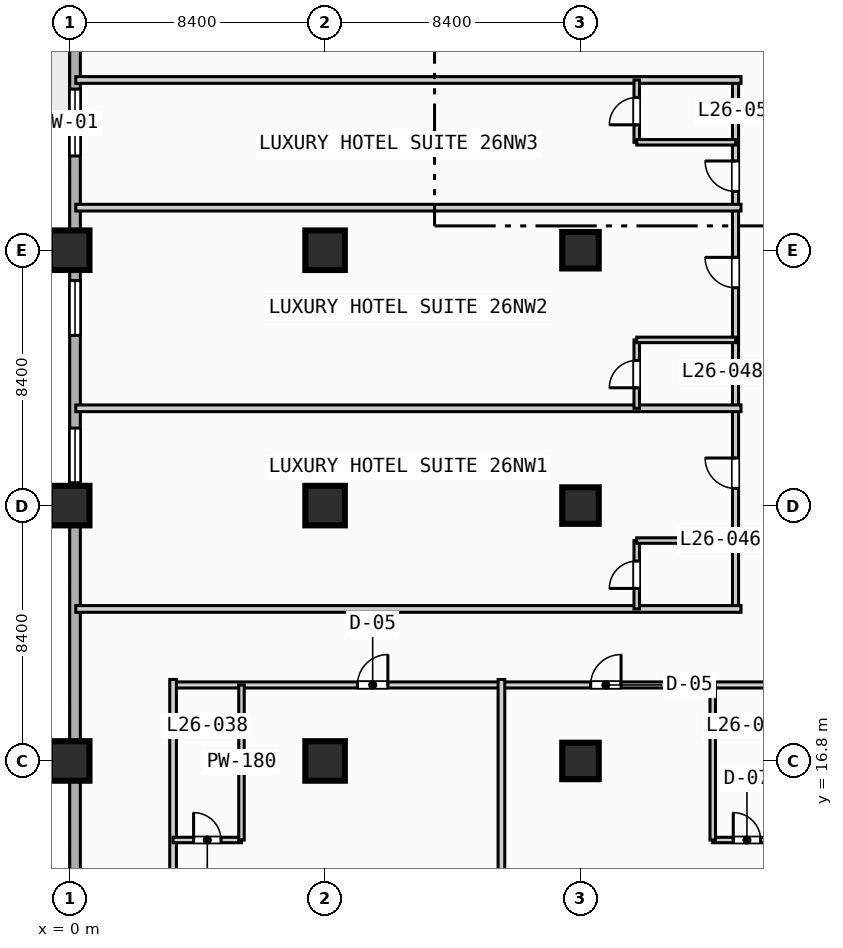
"""IFC4 building model, lengths in metres.
Left out: names, types, materials, properties, quantities, classifications, styles, units other than length and angle.
Written with IfcOpenShell. Run it as: python <this file> out.ifc"""

import sys

from ifc_helpers import new_model, si_unit, direction, frame, frame_2d, origin, origin_2d, place, context, subcontext, project, spatial, rectangle, extrude, element, fill, save


model = new_model("IFC4")
c1 = context("Model", 3, precision=1e-05, world=origin(), true_north=direction((0.0, 1.0)))
c2 = subcontext(c1, "Body", "Model", "MODEL_VIEW")
j1 = project(units=[si_unit("LENGTHUNIT", "METRE"), si_unit("PLANEANGLEUNIT", "RADIAN")], contexts=[c1])
p1 = place(None, origin())
s1 = spatial("IfcSite", under=j1, at=p1, CompositionType="ELEMENT")
p2 = place(p1, origin())
s2 = spatial("IfcBuilding", under=s1, at=p2, CompositionType="ELEMENT")
p3 = place(p2, frame((0.0, 0.0, 111.4)))
s3 = spatial("IfcBuildingStorey", under=s2, at=p3, CompositionType="ELEMENT", Elevation=111.4)
for number, where, z_axis, x_axis in (
    (1, (0.0, 16.8, 0.0), (0.0, 0.0, 1.0), (1.0, 0.0, 0.0)),
    (2, (0.0, 25.2, 0.0), (0.0, 0.0, 1.0), (1.0, 0.0, 0.0)),
    (3, (0.0, 33.6, 0.0), (0.0, 0.0, 1.0), (1.0, 0.0, 0.0)),
    (4, (8.4, 16.8, 0.0), (0.0, 0.0, 1.0), (1.0, 0.0, 0.0)),
    (5, (8.4, 25.2, 0.0), (0.0, 0.0, 1.0), (1.0, 0.0, 0.0)),
    (6, (8.4, 33.6, 0.0), (0.0, 0.0, 1.0), (1.0, 0.0, 0.0)),
):
    element("IfcColumn", number, at=place(p3, frame(where, z_axis=z_axis, x_axis=x_axis)), inside=s3, PredefinedType="COLUMN", context=c2, shape_type="SweptSolid", body=[
        extrude(rectangle(XDim=1.3, YDim=1.3, at=origin_2d()), origin(), (0.0, 0.0, 1.0), 3.8),
    ])
for number, where, z_axis, x_axis in (
    (7, (16.8, 16.8, 0.0), (0.0, 0.0, 1.0), (1.0, 0.0, 0.0)),
    (8, (16.8, 25.2, 0.0), (0.0, 0.0, 1.0), (1.0, 0.0, 0.0)),
    (9, (16.8, 33.6, 0.0), (0.0, 0.0, 1.0), (1.0, 0.0, 0.0)),
):
    element("IfcColumn", number, at=place(p3, frame(where, z_axis=z_axis, x_axis=x_axis)), inside=s3, PredefinedType="COLUMN", context=c2, shape_type="SweptSolid", body=[
        extrude(rectangle(XDim=1.2, YDim=1.2, at=origin_2d()), origin(), (0.0, 0.0, 1.0), 3.8),
    ])
p4 = place(p3, frame((0.175, 3.175, 0.0), z_axis=(0.0, 0.0, 1.0), x_axis=(0.0, 1.0, 0.0)))
e10 = element("IfcWall", 10, at=p4, inside=s3, PredefinedType="STANDARD", context=c2, shape_type="SweptSolid", body=[
    extrude(rectangle(XDim=86.05, YDim=0.35, at=frame_2d((43.025, 0.0))), origin(), (0.0, 0.0, 1.0), 3.55),
])
p5 = place(p4, frame((42.325, 0.0, 0.0)))
e11 = element("IfcOpeningElement", 11, at=p5, cuts=e10, PredefinedType="OPENING", context=c2, shape_type="SweptSolid", body=[
    extrude(rectangle(XDim=1.4, YDim=2.2, at=frame_2d((0.7, 1.1))), frame((0.0, 0.185, 0.0), z_axis=(0.0, -1.0, 0.0), x_axis=(1.0, 0.0, 0.0)), (0.0, 0.0, 1.0), 0.37),
])
p6 = place(p4, frame((33.525, 0.0, 0.85)))
e12 = element("IfcOpeningElement", 12, at=p6, cuts=e10, PredefinedType="OPENING", context=c2, shape_type="SweptSolid", body=[
    extrude(rectangle(XDim=2.2, YDim=1.8, at=frame_2d((1.1, 0.9))), frame((0.0, 0.185, 0.0), z_axis=(0.0, -1.0, 0.0), x_axis=(1.0, 0.0, 0.0)), (0.0, 0.0, 1.0), 0.37),
])
p7 = place(p4, frame((22.775, 0.0, 0.85)))
e13 = element("IfcOpeningElement", 13, at=p7, cuts=e10, PredefinedType="OPENING", context=c2, shape_type="SweptSolid", body=[
    extrude(rectangle(XDim=1.8, YDim=1.8, at=frame_2d((0.9, 0.9))), frame((0.0, 0.185, 0.0), z_axis=(0.0, -1.0, 0.0), x_axis=(1.0, 0.0, 0.0)), (0.0, 0.0, 1.0), 0.37),
])
p8 = place(p4, frame((27.625, 0.0, 0.85)))
e14 = element("IfcOpeningElement", 14, at=p8, cuts=e10, PredefinedType="OPENING", context=c2, shape_type="SweptSolid", body=[
    extrude(rectangle(XDim=1.8, YDim=1.8, at=frame_2d((0.9, 0.9))), frame((0.0, 0.185, 0.0), z_axis=(0.0, -1.0, 0.0), x_axis=(1.0, 0.0, 0.0)), (0.0, 0.0, 1.0), 0.37),
])
p9 = place(p3, frame((3.4, 19.3, 0.0), z_axis=(0.0, 0.0, 1.0), x_axis=(1.0, 0.0, 0.0)))
e15 = element("IfcWall", 15, at=p9, inside=s3, PredefinedType="PARTITIONING", context=c2, shape_type="SweptSolid", body=[
    extrude(rectangle(XDim=35.8, YDim=0.2, at=frame_2d((17.9, 0.0))), origin(), (0.0, 0.0, 1.0), 3.55),
])
p10 = place(p9, frame((6.065, 0.0, 0.0)))
e16 = element("IfcOpeningElement", 16, at=p10, cuts=e15, PredefinedType="OPENING", context=c2, shape_type="SweptSolid", body=[
    extrude(rectangle(XDim=1.0, YDim=2.15, at=frame_2d((0.5, 1.075))), frame((0.0, 0.11, 0.0), z_axis=(0.0, -1.0, 0.0), x_axis=(1.0, 0.0, 0.0)), (0.0, 0.0, 1.0), 0.22),
])
p11 = place(p9, frame((13.735, 0.0, 0.0)))
e17 = element("IfcOpeningElement", 17, at=p11, cuts=e15, PredefinedType="OPENING", context=c2, shape_type="SweptSolid", body=[
    extrude(rectangle(XDim=1.0, YDim=2.15, at=frame_2d((0.5, 1.075))), frame((0.0, 0.11, 0.0), z_axis=(0.0, -1.0, 0.0), x_axis=(1.0, 0.0, 0.0)), (0.0, 0.0, 1.0), 0.22),
])
p12 = place(p9, frame((22.96, 0.0, 0.0)))
e18 = element("IfcOpeningElement", 18, at=p12, cuts=e15, PredefinedType="OPENING", context=c2, shape_type="SweptSolid", body=[
    extrude(rectangle(XDim=1.0, YDim=2.15, at=frame_2d((0.5, 1.075))), frame((0.0, 0.11, 0.0), z_axis=(0.0, -1.0, 0.0), x_axis=(1.0, 0.0, 0.0)), (0.0, 0.0, 1.0), 0.22),
])
p13 = place(p9, frame((30.86, 0.0, 0.0)))
e19 = element("IfcOpeningElement", 19, at=p13, cuts=e15, PredefinedType="OPENING", context=c2, shape_type="SweptSolid", body=[
    extrude(rectangle(XDim=1.0, YDim=2.15, at=frame_2d((0.5, 1.075))), frame((0.0, 0.11, 0.0), z_axis=(0.0, -1.0, 0.0), x_axis=(1.0, 0.0, 0.0)), (0.0, 0.0, 1.0), 0.22),
])
p14 = place(p3, frame((3.4, 0.2, 0.0), z_axis=(0.0, 0.0, 1.0), x_axis=(0.0, 1.0, 0.0)))
e20 = element("IfcWall", 20, at=p14, inside=s3, PredefinedType="PARTITIONING", context=c2, shape_type="SweptSolid", body=[
    extrude(rectangle(XDim=19.28, YDim=0.22, at=frame_2d((9.64, 0.0))), origin(), (0.0, 0.0, 1.0), 3.55),
])
p15 = place(p3, frame((3.4, 14.2, 0.0), z_axis=(0.0, 0.0, 1.0), x_axis=(1.0, 0.0, 0.0)))
e21 = element("IfcWall", 21, at=p15, inside=s3, PredefinedType="PLUMBINGWALL", context=c2, shape_type="SweptSolid", body=[
    extrude(rectangle(XDim=2.25, YDim=0.18, at=frame_2d((1.125, 0.0))), origin(), (0.0, 0.0, 1.0), 3.55),
])
p16 = place(p15, frame((0.675, 0.0, 0.0)))
e22 = element("IfcOpeningElement", 22, at=p16, cuts=e21, PredefinedType="OPENING", context=c2, shape_type="SweptSolid", body=[
    extrude(rectangle(XDim=0.9, YDim=2.1, at=frame_2d((0.45, 1.05))), frame((0.0, 0.1, 0.0), z_axis=(0.0, -1.0, 0.0), x_axis=(1.0, 0.0, 0.0)), (0.0, 0.0, 1.0), 0.2),
])
p17 = place(p3, frame((5.65, 14.2, 0.0), z_axis=(0.0, 0.0, 1.0), x_axis=(0.0, 1.0, 0.0)))
e23 = element("IfcWall", 23, at=p17, inside=s3, PredefinedType="PLUMBINGWALL", context=c2, shape_type="SweptSolid", body=[
    extrude(rectangle(XDim=5.1, YDim=0.18, at=frame_2d((2.55, 0.0))), origin(), (0.0, 0.0, 1.0), 3.55),
])
p18 = place(p3, frame((14.2, 0.2, 0.0), z_axis=(0.0, 0.0, 1.0), x_axis=(0.0, 1.0, 0.0)))
e24 = element("IfcWall", 24, at=p18, inside=s3, PredefinedType="PARTITIONING", context=c2, shape_type="SweptSolid", body=[
    extrude(rectangle(XDim=19.28, YDim=0.22, at=frame_2d((9.64, 0.0))), origin(), (0.0, 0.0, 1.0), 3.55),
])
p19 = place(p3, frame((21.15, 14.2, 0.0), z_axis=(0.0, 0.0, 1.0), x_axis=(1.0, 0.0, 0.0)))
e25 = element("IfcWall", 25, at=p19, inside=s3, PredefinedType="PLUMBINGWALL", context=c2, shape_type="SweptSolid", body=[
    extrude(rectangle(XDim=2.25, YDim=0.18, at=frame_2d((1.125, 0.0))), origin(), (0.0, 0.0, 1.0), 3.55),
])
p20 = place(p19, frame((0.675, 0.0, 0.0)))
e26 = element("IfcOpeningElement", 26, at=p20, cuts=e25, PredefinedType="OPENING", context=c2, shape_type="SweptSolid", body=[
    extrude(rectangle(XDim=0.9, YDim=2.1, at=frame_2d((0.45, 1.05))), frame((0.0, 0.1, 0.0), z_axis=(0.0, -1.0, 0.0), x_axis=(1.0, 0.0, 0.0)), (0.0, 0.0, 1.0), 0.2),
])
p21 = place(p3, frame((21.15, 14.2, 0.0), z_axis=(0.0, 0.0, 1.0), x_axis=(0.0, 1.0, 0.0)))
e27 = element("IfcWall", 27, at=p21, inside=s3, PredefinedType="PLUMBINGWALL", context=c2, shape_type="SweptSolid", body=[
    extrude(rectangle(XDim=5.1, YDim=0.18, at=frame_2d((2.55, 0.0))), origin(), (0.0, 0.0, 1.0), 3.55),
])
p22 = place(p3, frame((21.9, 21.8, 0.0), z_axis=(0.0, 0.0, 1.0), x_axis=(0.0, 1.0, 0.0)))
e28 = element("IfcWall", 28, at=p22, inside=s3, PredefinedType="PARTITIONING", context=c2, shape_type="SweptSolid", body=[
    extrude(rectangle(XDim=17.4, YDim=0.2, at=frame_2d((8.7, 0.0))), origin(), (0.0, 0.0, 1.0), 3.55),
])
p23 = place(p22, frame((3.965, 0.0, 0.0)))
e29 = element("IfcOpeningElement", 29, at=p23, cuts=e28, PredefinedType="OPENING", context=c2, shape_type="SweptSolid", body=[
    extrude(rectangle(XDim=1.0, YDim=2.15, at=frame_2d((0.5, 1.075))), frame((0.0, 0.11, 0.0), z_axis=(0.0, -1.0, 0.0), x_axis=(1.0, 0.0, 0.0)), (0.0, 0.0, 1.0), 0.22),
])
p24 = place(p22, frame((10.565, 0.0, 0.0)))
e30 = element("IfcOpeningElement", 30, at=p24, cuts=e28, PredefinedType="OPENING", context=c2, shape_type="SweptSolid", body=[
    extrude(rectangle(XDim=1.0, YDim=2.15, at=frame_2d((0.5, 1.075))), frame((0.0, 0.11, 0.0), z_axis=(0.0, -1.0, 0.0), x_axis=(1.0, 0.0, 0.0)), (0.0, 0.0, 1.0), 0.22),
])
p25 = place(p22, frame((13.735, 0.0, 0.0)))
e31 = element("IfcOpeningElement", 31, at=p25, cuts=e28, PredefinedType="OPENING", context=c2, shape_type="SweptSolid", body=[
    extrude(rectangle(XDim=1.0, YDim=2.15, at=frame_2d((0.5, 1.075))), frame((0.0, 0.11, 0.0), z_axis=(0.0, -1.0, 0.0), x_axis=(1.0, 0.0, 0.0)), (0.0, 0.0, 1.0), 0.22),
])
p26 = place(p3, frame((0.2, 21.8, 0.0), z_axis=(0.0, 0.0, 1.0), x_axis=(1.0, 0.0, 0.0)))
e32 = element("IfcWall", 32, at=p26, inside=s3, PredefinedType="PARTITIONING", context=c2, shape_type="SweptSolid", body=[
    extrude(rectangle(XDim=21.88, YDim=0.22, at=frame_2d((10.94, 0.0))), origin(), (0.0, 0.0, 1.0), 3.55),
])
p27 = place(p3, frame((18.65, 21.8, 0.0), z_axis=(0.0, 0.0, 1.0), x_axis=(0.0, 1.0, 0.0)))
e33 = element("IfcWall", 33, at=p27, inside=s3, PredefinedType="PLUMBINGWALL", context=c2, shape_type="SweptSolid", body=[
    extrude(rectangle(XDim=2.25, YDim=0.18, at=frame_2d((1.125, 0.0))), origin(), (0.0, 0.0, 1.0), 3.55),
])
p28 = place(p27, frame((0.675, 0.0, 0.0)))
e34 = element("IfcOpeningElement", 34, at=p28, cuts=e33, PredefinedType="OPENING", context=c2, shape_type="SweptSolid", body=[
    extrude(rectangle(XDim=0.9, YDim=2.1, at=frame_2d((0.45, 1.05))), frame((0.0, 0.1, 0.0), z_axis=(0.0, -1.0, 0.0), x_axis=(1.0, 0.0, 0.0)), (0.0, 0.0, 1.0), 0.2),
])
p29 = place(p3, frame((18.65, 24.05, 0.0), z_axis=(0.0, 0.0, 1.0), x_axis=(1.0, 0.0, 0.0)))
e35 = element("IfcWall", 35, at=p29, inside=s3, PredefinedType="PLUMBINGWALL", context=c2, shape_type="SweptSolid", body=[
    extrude(rectangle(XDim=3.25, YDim=0.18, at=frame_2d((1.625, 0.0))), origin(), (0.0, 0.0, 1.0), 3.55),
])
p30 = place(p3, frame((0.2, 28.4, 0.0), z_axis=(0.0, 0.0, 1.0), x_axis=(1.0, 0.0, 0.0)))
e36 = element("IfcWall", 36, at=p30, inside=s3, PredefinedType="PARTITIONING", context=c2, shape_type="SweptSolid", body=[
    extrude(rectangle(XDim=21.88, YDim=0.22, at=frame_2d((10.94, 0.0))), origin(), (0.0, 0.0, 1.0), 3.55),
])
p31 = place(p3, frame((18.65, 28.4, 0.0), z_axis=(0.0, 0.0, 1.0), x_axis=(0.0, 1.0, 0.0)))
e37 = element("IfcWall", 37, at=p31, inside=s3, PredefinedType="PLUMBINGWALL", context=c2, shape_type="SweptSolid", body=[
    extrude(rectangle(XDim=2.25, YDim=0.18, at=frame_2d((1.125, 0.0))), origin(), (0.0, 0.0, 1.0), 3.55),
])
p32 = place(p31, frame((0.675, 0.0, 0.0)))
e38 = element("IfcOpeningElement", 38, at=p32, cuts=e37, PredefinedType="OPENING", context=c2, shape_type="SweptSolid", body=[
    extrude(rectangle(XDim=0.9, YDim=2.1, at=frame_2d((0.45, 1.05))), frame((0.0, 0.1, 0.0), z_axis=(0.0, -1.0, 0.0), x_axis=(1.0, 0.0, 0.0)), (0.0, 0.0, 1.0), 0.2),
])
p33 = place(p3, frame((18.65, 30.65, 0.0), z_axis=(0.0, 0.0, 1.0), x_axis=(1.0, 0.0, 0.0)))
e39 = element("IfcWall", 39, at=p33, inside=s3, PredefinedType="PLUMBINGWALL", context=c2, shape_type="SweptSolid", body=[
    extrude(rectangle(XDim=3.25, YDim=0.18, at=frame_2d((1.625, 0.0))), origin(), (0.0, 0.0, 1.0), 3.55),
])
for number, where, z_axis, x_axis in (
    (40, (0.2, 35.0, 0.0), (0.0, 0.0, 1.0), (1.0, 0.0, 0.0)),
    (41, (0.2, 39.2, 0.0), (0.0, 0.0, 1.0), (1.0, 0.0, 0.0)),
):
    element("IfcWall", number, at=place(p3, frame(where, z_axis=z_axis, x_axis=x_axis)), inside=s3, PredefinedType="PARTITIONING", context=c2, shape_type="SweptSolid", body=[
        extrude(rectangle(XDim=21.88, YDim=0.22, at=frame_2d((10.94, 0.0))), origin(), (0.0, 0.0, 1.0), 3.55),
    ])
p34 = place(p3, frame((18.65, 37.15, 0.0), z_axis=(0.0, 0.0, 1.0), x_axis=(0.0, 1.0, 0.0)))
e42 = element("IfcWall", 42, at=p34, inside=s3, PredefinedType="PLUMBINGWALL", context=c2, shape_type="SweptSolid", body=[
    extrude(rectangle(XDim=2.05, YDim=0.18, at=frame_2d((1.025, 0.0))), origin(), (0.0, 0.0, 1.0), 3.55),
])
p35 = place(p34, frame((0.575, 0.0, 0.0)))
e43 = element("IfcOpeningElement", 43, at=p35, cuts=e42, PredefinedType="OPENING", context=c2, shape_type="SweptSolid", body=[
    extrude(rectangle(XDim=0.9, YDim=2.1, at=frame_2d((0.45, 1.05))), frame((0.0, 0.1, 0.0), z_axis=(0.0, -1.0, 0.0), x_axis=(1.0, 0.0, 0.0)), (0.0, 0.0, 1.0), 0.2),
])
p36 = place(p3, frame((18.65, 37.15, 0.0), z_axis=(0.0, 0.0, 1.0), x_axis=(1.0, 0.0, 0.0)))
e44 = element("IfcWall", 44, at=p36, inside=s3, PredefinedType="PLUMBINGWALL", context=c2, shape_type="SweptSolid", body=[
    extrude(rectangle(XDim=3.25, YDim=0.18, at=frame_2d((1.625, 0.0))), origin(), (0.0, 0.0, 1.0), 3.55),
])
p37 = place(p6, origin())
e45 = element("IfcWindow", 45, at=p37, inside=s3, PartitioningType="SINGLE_PANEL", PredefinedType="WINDOW", context=c2, shape_type="SweptSolid", body=[
    extrude(rectangle(XDim=2.2, YDim=1.8, at=frame_2d((1.1, 0.9))), frame((0.0, 0.03, 0.0), z_axis=(0.0, -1.0, 0.0), x_axis=(1.0, 0.0, 0.0)), (0.0, 0.0, 1.0), 0.06),
])
fill(e12, e45)
p38 = place(p7, origin())
e46 = element("IfcWindow", 46, at=p38, inside=s3, PartitioningType="SINGLE_PANEL", PredefinedType="WINDOW", context=c2, shape_type="SweptSolid", body=[
    extrude(rectangle(XDim=1.8, YDim=1.8, at=frame_2d((0.9, 0.9))), frame((0.0, 0.03, 0.0), z_axis=(0.0, -1.0, 0.0), x_axis=(1.0, 0.0, 0.0)), (0.0, 0.0, 1.0), 0.06),
])
fill(e13, e46)
p39 = place(p8, origin())
e47 = element("IfcWindow", 47, at=p39, inside=s3, PartitioningType="SINGLE_PANEL", PredefinedType="WINDOW", context=c2, shape_type="SweptSolid", body=[
    extrude(rectangle(XDim=1.8, YDim=1.8, at=frame_2d((0.9, 0.9))), frame((0.0, 0.03, 0.0), z_axis=(0.0, -1.0, 0.0), x_axis=(1.0, 0.0, 0.0)), (0.0, 0.0, 1.0), 0.06),
])
fill(e14, e47)
p40 = place(p10, origin())
e48 = element("IfcDoor", 48, at=p40, inside=s3, OperationType="SINGLE_SWING_RIGHT", PredefinedType="DOOR", context=c2, shape_type="SweptSolid", body=[
    extrude(rectangle(XDim=1.0, YDim=2.15, at=frame_2d((0.5, 1.075))), frame((0.0, 0.025, 0.0), z_axis=(0.0, -1.0, 0.0), x_axis=(1.0, 0.0, 0.0)), (0.0, 0.0, 1.0), 0.05),
])
fill(e16, e48)
p41 = place(p11, origin())
e49 = element("IfcDoor", 49, at=p41, inside=s3, OperationType="SINGLE_SWING_RIGHT", PredefinedType="DOOR", context=c2, shape_type="SweptSolid", body=[
    extrude(rectangle(XDim=1.0, YDim=2.15, at=frame_2d((0.5, 1.075))), frame((0.0, 0.025, 0.0), z_axis=(0.0, -1.0, 0.0), x_axis=(1.0, 0.0, 0.0)), (0.0, 0.0, 1.0), 0.05),
])
fill(e17, e49)
p42 = place(p16, origin())
e50 = element("IfcDoor", 50, at=p42, inside=s3, OperationType="SINGLE_SWING_LEFT", PredefinedType="DOOR", context=c2, shape_type="SweptSolid", body=[
    extrude(rectangle(XDim=0.9, YDim=2.1, at=frame_2d((0.45, 1.05))), frame((0.0, 0.025, 0.0), z_axis=(0.0, -1.0, 0.0), x_axis=(1.0, 0.0, 0.0)), (0.0, 0.0, 1.0), 0.05),
])
fill(e22, e50)
p43 = place(p20, origin())
e51 = element("IfcDoor", 51, at=p43, inside=s3, OperationType="SINGLE_SWING_LEFT", PredefinedType="DOOR", context=c2, shape_type="SweptSolid", body=[
    extrude(rectangle(XDim=0.9, YDim=2.1, at=frame_2d((0.45, 1.05))), frame((0.0, 0.025, 0.0), z_axis=(0.0, -1.0, 0.0), x_axis=(1.0, 0.0, 0.0)), (0.0, 0.0, 1.0), 0.05),
])
fill(e26, e51)
p44 = place(p23, origin())
e52 = element("IfcDoor", 52, at=p44, inside=s3, OperationType="SINGLE_SWING_RIGHT", PredefinedType="DOOR", context=c2, shape_type="SweptSolid", body=[
    extrude(rectangle(XDim=1.0, YDim=2.15, at=frame_2d((0.5, 1.075))), frame((0.0, 0.025, 0.0), z_axis=(0.0, -1.0, 0.0), x_axis=(1.0, 0.0, 0.0)), (0.0, 0.0, 1.0), 0.05),
])
fill(e29, e52)
p45 = place(p24, origin())
e53 = element("IfcDoor", 53, at=p45, inside=s3, OperationType="SINGLE_SWING_RIGHT", PredefinedType="DOOR", context=c2, shape_type="SweptSolid", body=[
    extrude(rectangle(XDim=1.0, YDim=2.15, at=frame_2d((0.5, 1.075))), frame((0.0, 0.025, 0.0), z_axis=(0.0, -1.0, 0.0), x_axis=(1.0, 0.0, 0.0)), (0.0, 0.0, 1.0), 0.05),
])
fill(e30, e53)
p46 = place(p25, origin())
e54 = element("IfcDoor", 54, at=p46, inside=s3, OperationType="SINGLE_SWING_RIGHT", PredefinedType="DOOR", context=c2, shape_type="SweptSolid", body=[
    extrude(rectangle(XDim=1.0, YDim=2.15, at=frame_2d((0.5, 1.075))), frame((0.0, 0.025, 0.0), z_axis=(0.0, -1.0, 0.0), x_axis=(1.0, 0.0, 0.0)), (0.0, 0.0, 1.0), 0.05),
])
fill(e31, e54)
p47 = place(p28, origin())
e55 = element("IfcDoor", 55, at=p47, inside=s3, OperationType="SINGLE_SWING_LEFT", PredefinedType="DOOR", context=c2, shape_type="SweptSolid", body=[
    extrude(rectangle(XDim=0.9, YDim=2.1, at=frame_2d((0.45, 1.05))), frame((0.0, 0.025, 0.0), z_axis=(0.0, -1.0, 0.0), x_axis=(1.0, 0.0, 0.0)), (0.0, 0.0, 1.0), 0.05),
])
fill(e34, e55)
p48 = place(p32, origin())
e56 = element("IfcDoor", 56, at=p48, inside=s3, OperationType="SINGLE_SWING_LEFT", PredefinedType="DOOR", context=c2, shape_type="SweptSolid", body=[
    extrude(rectangle(XDim=0.9, YDim=2.1, at=frame_2d((0.45, 1.05))), frame((0.0, 0.025, 0.0), z_axis=(0.0, -1.0, 0.0), x_axis=(1.0, 0.0, 0.0)), (0.0, 0.0, 1.0), 0.05),
])
fill(e38, e56)
p49 = place(p35, origin())
e57 = element("IfcDoor", 57, at=p49, inside=s3, OperationType="SINGLE_SWING_LEFT", PredefinedType="DOOR", context=c2, shape_type="SweptSolid", body=[
    extrude(rectangle(XDim=0.9, YDim=2.1, at=frame_2d((0.45, 1.05))), frame((0.0, 0.025, 0.0), z_axis=(0.0, -1.0, 0.0), x_axis=(1.0, 0.0, 0.0)), (0.0, 0.0, 1.0), 0.05),
])
fill(e43, e57)
save(model, sys.argv[1])
